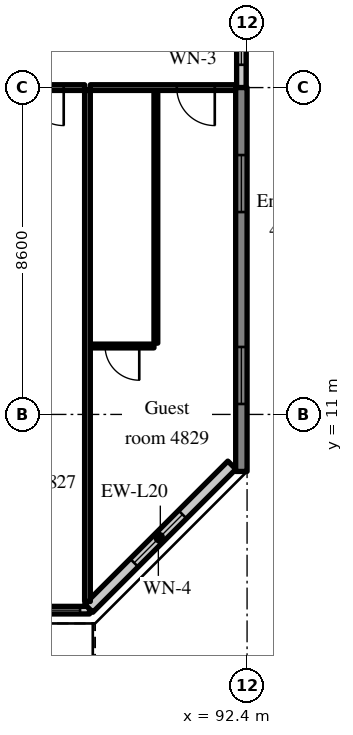
"""IFC4 building model, lengths in metres.
Left out: names, types, materials, properties, quantities, classifications, styles, units other than length and angle.
Written with IfcOpenShell. Run it as: python <this file> out.ifc"""

import sys

from ifc_helpers import new_model, si_unit, direction, frame, frame_2d, origin, place, context, subcontext, project, spatial, rectangle, extrude, source, transform, mapped, element, fill, save


model = new_model("IFC4")
c1 = context("Model", 3, precision=1e-05, world=origin(), true_north=direction((0.0, 1.0)))
c2 = subcontext(c1, "Body", "Model", "MODEL_VIEW")
j1 = project(units=[si_unit("LENGTHUNIT", "METRE"), si_unit("PLANEANGLEUNIT", "RADIAN")], contexts=[c1])
p1 = place(None, origin())
s1 = spatial("IfcSite", under=j1, at=p1, CompositionType="ELEMENT")
p2 = place(p1, origin())
s2 = spatial("IfcBuilding", under=s1, at=p2, CompositionType="ELEMENT")
p3 = place(p2, frame((0.0, 0.0, 197.2)))
s3 = spatial("IfcBuildingStorey", under=s2, at=p3, CompositionType="ELEMENT", Elevation=197.2)
m1 = source(origin(), c2, "Body", "SweptSolid", [
    extrude(rectangle(XDim=10.1, YDim=0.3, at=frame_2d((5.05, 0.0))), origin(), (0.0, 0.0, 1.0), 3.52),
])
p4 = place(p3, frame((92.25, 9.5, 0.0), z_axis=(0.0, 0.0, 1.0), x_axis=(0.0, 1.0, 0.0)))
e1 = element("IfcWall", 1, at=p4, inside=s3, PredefinedType="SHEAR", context=c2, shape_type="MappedRepresentation", body=[
    mapped(m1, transform((0.0, 0.0, 0.0), scale=1.0)),
])
m2 = source(origin(), c2, "Body", "SweptSolid", [
    extrude(rectangle(XDim=1.5, YDim=1.5, at=frame_2d((0.75, 0.75))), frame((0.0, 0.16, 0.0), z_axis=(0.0, -1.0, 0.0), x_axis=(1.0, 0.0, 0.0)), (0.0, 0.0, 1.0), 0.32),
])
p5 = place(p4, frame((1.775, 0.0, 0.9)))
e2 = element("IfcOpeningElement", 2, at=p5, cuts=e1, PredefinedType="OPENING", context=c2, shape_type="MappedRepresentation", body=[
    mapped(m2, transform((0.0, 0.0, 0.0), scale=1.0)),
])
p6 = place(p4, frame((6.825, 0.0, 0.9)))
e3 = element("IfcOpeningElement", 3, at=p6, cuts=e1, PredefinedType="OPENING", context=c2, shape_type="MappedRepresentation", body=[
    mapped(m2, transform((0.0, 0.0, 0.0), scale=1.0)),
])
m3 = source(origin(), c2, "Body", "SweptSolid", [
    extrude(rectangle(XDim=4.105, YDim=0.2, at=frame_2d((2.052, 0.0))), origin(), (0.0, 0.0, 1.0), 2.87),
])
p7 = place(p3, frame((84.15, 5.85, 0.0), z_axis=(0.0, 0.0, 1.0), x_axis=(1.0, 0.0, 0.0)))
e4 = element("IfcWall", 4, at=p7, inside=s3, PredefinedType="SOLIDWALL", context=c2, shape_type="MappedRepresentation", body=[
    mapped(m3, transform((0.0, 0.0, 0.0), scale=1.0)),
])
m4 = source(origin(), c2, "Body", "SweptSolid", [
    extrude(rectangle(XDim=1.2, YDim=2.4, at=frame_2d((0.6, 1.2))), frame((0.0, 0.11, 0.0), z_axis=(0.0, -1.0, 0.0), x_axis=(1.0, 0.0, 0.0)), (0.0, 0.0, 1.0), 0.22),
])
p8 = place(p7, frame((0.25, 0.0, 0.0)))
e5 = element("IfcOpeningElement", 5, at=p8, cuts=e4, PredefinedType="OPENING", context=c2, shape_type="MappedRepresentation", body=[
    mapped(m4, transform((0.0, 0.0, 0.0), scale=1.0)),
])
m5 = source(origin(), c2, "Body", "SweptSolid", [
    extrude(rectangle(XDim=1.5, YDim=1.5, at=frame_2d((0.75, 0.75))), frame((0.0, 0.11, 0.0), z_axis=(0.0, -1.0, 0.0), x_axis=(1.0, 0.0, 0.0)), (0.0, 0.0, 1.0), 0.22),
])
p9 = place(p7, frame((2.355, 0.0, 0.9)))
e6 = element("IfcOpeningElement", 6, at=p9, cuts=e4, PredefinedType="OPENING", context=c2, shape_type="MappedRepresentation", body=[
    mapped(m5, transform((0.0, 0.0, 0.0), scale=1.0)),
])
m6 = source(origin(), c2, "Body", "SweptSolid", [
    extrude(rectangle(XDim=5.326, YDim=0.3, at=frame_2d((2.663, 0.0))), origin(), (0.0, 0.0, 1.0), 3.52),
])
p10 = place(p3, frame((88.234, 5.9, 0.0), z_axis=(0.0, 0.0, 1.0), x_axis=(0.707083859269, 0.707129702361, 0.0)))
e7 = element("IfcWall", 7, at=p10, inside=s3, PredefinedType="SOLIDWALL", context=c2, shape_type="MappedRepresentation", body=[
    mapped(m6, transform((0.0, 0.0, 0.0), scale=1.0)),
])
m7 = source(origin(), c2, "Body", "SweptSolid", [
    extrude(rectangle(XDim=1.8, YDim=1.5, at=frame_2d((0.9, 0.75))), frame((0.0, 0.16, 0.0), z_axis=(0.0, -1.0, 0.0), x_axis=(1.0, 0.0, 0.0)), (0.0, 0.0, 1.0), 0.32),
])
p11 = place(p10, frame((1.689, 0.0, 0.9)))
e8 = element("IfcOpeningElement", 8, at=p11, cuts=e7, PredefinedType="OPENING", context=c2, shape_type="MappedRepresentation", body=[
    mapped(m7, transform((0.0, 0.0, 0.0), scale=1.0)),
])
m8 = source(origin(), c2, "Body", "SweptSolid", [
    extrude(rectangle(XDim=2.4, YDim=0.25, at=frame_2d((1.2, 0.0))), origin(), (0.0, 0.0, 1.0), 2.62),
])
p12 = place(p3, frame((92.25, 19.6, 0.0), z_axis=(0.0, 0.0, 1.0), x_axis=(0.0, 1.0, 0.0)))
e9 = element("IfcWall", 9, at=p12, inside=s3, PredefinedType="SOLIDWALL", context=c2, shape_type="MappedRepresentation", body=[
    mapped(m8, transform((0.0, 0.0, 0.0), scale=1.0)),
])
m9 = source(origin(), c2, "Body", "SweptSolid", [
    extrude(rectangle(XDim=1.2, YDim=1.5, at=frame_2d((0.6, 0.75))), frame((0.0, 0.135, 0.0), z_axis=(0.0, -1.0, 0.0), x_axis=(1.0, 0.0, 0.0)), (0.0, 0.0, 1.0), 0.27),
])
p13 = place(p12, frame((0.6, 0.0, 0.9)))
e10 = element("IfcOpeningElement", 10, at=p13, cuts=e9, PredefinedType="OPENING", context=c2, shape_type="MappedRepresentation", body=[
    mapped(m9, transform((0.0, 0.0, 0.0), scale=1.0)),
])
m10 = source(origin(), c2, "Body", "SweptSolid", [
    extrude(rectangle(XDim=3.975, YDim=0.15, at=frame_2d((1.988, 0.0))), origin(), (0.0, 0.0, 1.0), 2.82),
])
p14 = place(p3, frame((84.15, 19.6, 0.0), z_axis=(0.0, 0.0, 1.0), x_axis=(1.0, 0.0, 0.0)))
e11 = element("IfcWall", 11, at=p14, inside=s3, PredefinedType="PARTITIONING", context=c2, shape_type="MappedRepresentation", body=[
    mapped(m10, transform((0.0, 0.0, 0.0), scale=1.0)),
])
m11 = source(origin(), c2, "Body", "SweptSolid", [
    extrude(rectangle(XDim=1.0, YDim=2.1, at=frame_2d((0.5, 1.05))), frame((0.0, 0.085, 0.0), z_axis=(0.0, -1.0, 0.0), x_axis=(1.0, 0.0, 0.0)), (0.0, 0.0, 1.0), 0.17),
])
p15 = place(p14, frame((2.425, 0.0, 0.0)))
e12 = element("IfcOpeningElement", 12, at=p15, cuts=e11, PredefinedType="OPENING", context=c2, shape_type="MappedRepresentation", body=[
    mapped(m11, transform((0.0, 0.0, 0.0), scale=1.0)),
])
m12 = source(origin(), c2, "Body", "SweptSolid", [
    extrude(rectangle(XDim=6.65, YDim=0.1, at=frame_2d((3.325, 0.0))), origin(), (0.0, 0.0, 1.0), 3.52),
])
p16 = place(p3, frame((90.0, 12.875, 0.0), z_axis=(0.0, 0.0, 1.0), x_axis=(0.0, 1.0, 0.0)))
e13 = element("IfcWall", 13, at=p16, inside=s3, PredefinedType="PARTITIONING", context=c2, shape_type="MappedRepresentation", body=[
    mapped(m12, transform((0.0, 0.0, 0.0), scale=1.0)),
])
m13 = source(origin(), c2, "Body", "SweptSolid", [
    extrude(rectangle(XDim=1.675, YDim=0.1, at=frame_2d((0.837, 0.0))), origin(), (0.0, 0.0, 1.0), 3.52),
])
p17 = place(p3, frame((88.275, 12.8, 0.0), z_axis=(0.0, 0.0, 1.0), x_axis=(1.0, 0.0, 0.0)))
e14 = element("IfcWall", 14, at=p17, inside=s3, PredefinedType="PARTITIONING", context=c2, shape_type="MappedRepresentation", body=[
    mapped(m13, transform((0.0, 0.0, 0.0), scale=1.0)),
])
m14 = source(origin(), c2, "Body", "SweptSolid", [
    extrude(rectangle(XDim=0.9, YDim=2.1, at=frame_2d((0.45, 1.05))), frame((0.0, 0.06, 0.0), z_axis=(0.0, -1.0, 0.0), x_axis=(1.0, 0.0, 0.0)), (0.0, 0.0, 1.0), 0.12),
])
p18 = place(p17, frame((0.388, 0.0, 0.0)))
e15 = element("IfcOpeningElement", 15, at=p18, cuts=e14, PredefinedType="OPENING", context=c2, shape_type="MappedRepresentation", body=[
    mapped(m14, transform((0.0, 0.0, 0.0), scale=1.0)),
])
m15 = source(origin(), c2, "Body", "SweptSolid", [
    extrude(rectangle(XDim=3.825, YDim=0.15, at=frame_2d((1.913, 0.0))), origin(), (0.0, 0.0, 1.0), 2.82),
])
p19 = place(p3, frame((88.275, 19.6, 0.0), z_axis=(0.0, 0.0, 1.0), x_axis=(1.0, 0.0, 0.0)))
e16 = element("IfcWall", 16, at=p19, inside=s3, PredefinedType="PARTITIONING", context=c2, shape_type="MappedRepresentation", body=[
    mapped(m15, transform((0.0, 0.0, 0.0), scale=1.0)),
])
p20 = place(p19, frame((2.275, 0.0, 0.0)))
e17 = element("IfcOpeningElement", 17, at=p20, cuts=e16, PredefinedType="OPENING", context=c2, shape_type="MappedRepresentation", body=[
    mapped(m11, transform((0.0, 0.0, 0.0), scale=1.0)),
])
m16 = source(origin(), c2, "Body", "SweptSolid", [
    extrude(rectangle(XDim=13.447, YDim=0.15, at=frame_2d((6.724, 0.0))), origin(), (0.0, 0.0, 1.0), 3.52),
])
p21 = place(p3, frame((88.2, 6.078, 0.0), z_axis=(0.0, 0.0, 1.0), x_axis=(0.0, 1.0, 0.0)))
e18 = element("IfcWall", 18, at=p21, inside=s3, PredefinedType="PARTITIONING", context=c2, shape_type="MappedRepresentation", body=[
    mapped(m16, transform((0.0, 0.0, 0.0), scale=1.0)),
])
m17 = source(origin(), c2, "Body", "SweptSolid", [
    extrude(rectangle(XDim=1.5, YDim=1.5, at=frame_2d((0.75, 0.75))), frame((0.0, 0.03, 0.0), z_axis=(0.0, -1.0, 0.0), x_axis=(1.0, 0.0, 0.0)), (0.0, 0.0, 1.0), 0.06),
])
p22 = place(p9, origin())
e19 = element("IfcWindow", 19, at=p22, inside=s3, PartitioningType="SINGLE_PANEL", PredefinedType="WINDOW", context=c2, shape_type="MappedRepresentation", body=[
    mapped(m17, transform((0.0, 0.0, 0.0), scale=1.0)),
])
fill(e6, e19)
m18 = source(origin(), c2, "Body", "SweptSolid", [
    extrude(rectangle(XDim=1.8, YDim=1.5, at=frame_2d((0.9, 0.75))), frame((0.0, 0.03, 0.0), z_axis=(0.0, -1.0, 0.0), x_axis=(1.0, 0.0, 0.0)), (0.0, 0.0, 1.0), 0.06),
])
p23 = place(p11, origin())
e20 = element("IfcWindow", 20, at=p23, inside=s3, PartitioningType="SINGLE_PANEL", PredefinedType="WINDOW", context=c2, shape_type="MappedRepresentation", body=[
    mapped(m18, transform((0.0, 0.0, 0.0), scale=1.0)),
])
fill(e8, e20)
p24 = place(p5, origin())
e21 = element("IfcWindow", 21, at=p24, inside=s3, PartitioningType="SINGLE_PANEL", PredefinedType="WINDOW", context=c2, shape_type="MappedRepresentation", body=[
    mapped(m17, transform((0.0, 0.0, 0.0), scale=1.0)),
])
fill(e2, e21)
p25 = place(p6, origin())
e22 = element("IfcWindow", 22, at=p25, inside=s3, PartitioningType="SINGLE_PANEL", PredefinedType="WINDOW", context=c2, shape_type="MappedRepresentation", body=[
    mapped(m17, transform((0.0, 0.0, 0.0), scale=1.0)),
])
fill(e3, e22)
m19 = source(origin(), c2, "Body", "SweptSolid", [
    extrude(rectangle(XDim=1.2, YDim=1.5, at=frame_2d((0.6, 0.75))), frame((0.0, 0.03, 0.0), z_axis=(0.0, -1.0, 0.0), x_axis=(1.0, 0.0, 0.0)), (0.0, 0.0, 1.0), 0.06),
])
p26 = place(p13, origin())
e23 = element("IfcWindow", 23, at=p26, inside=s3, PartitioningType="SINGLE_PANEL", PredefinedType="WINDOW", context=c2, shape_type="MappedRepresentation", body=[
    mapped(m19, transform((0.0, 0.0, 0.0), scale=1.0)),
])
fill(e10, e23)
m20 = source(origin(), c2, "Body", "SweptSolid", [
    extrude(rectangle(XDim=1.0, YDim=2.1, at=frame_2d((0.5, 1.05))), frame((0.0, 0.025, 0.0), z_axis=(0.0, -1.0, 0.0), x_axis=(1.0, 0.0, 0.0)), (0.0, 0.0, 1.0), 0.05),
])
p27 = place(p15, origin())
e24 = element("IfcDoor", 24, at=p27, inside=s3, OperationType="SINGLE_SWING_RIGHT", PredefinedType="DOOR", context=c2, shape_type="MappedRepresentation", body=[
    mapped(m20, transform((0.0, 0.0, 0.0), scale=1.0)),
])
fill(e12, e24)
m21 = source(origin(), c2, "Body", "SweptSolid", [
    extrude(rectangle(XDim=0.9, YDim=2.1, at=frame_2d((0.45, 1.05))), frame((0.0, 0.025, 0.0), z_axis=(0.0, -1.0, 0.0), x_axis=(1.0, 0.0, 0.0)), (0.0, 0.0, 1.0), 0.05),
])
p28 = place(p18, origin())
e25 = element("IfcDoor", 25, at=p28, inside=s3, OperationType="SINGLE_SWING_RIGHT", PredefinedType="DOOR", context=c2, shape_type="MappedRepresentation", body=[
    mapped(m21, transform((0.0, 0.0, 0.0), scale=1.0)),
])
fill(e15, e25)
p29 = place(p20, origin())
e26 = element("IfcDoor", 26, at=p29, inside=s3, OperationType="SINGLE_SWING_RIGHT", PredefinedType="DOOR", context=c2, shape_type="MappedRepresentation", body=[
    mapped(m20, transform((0.0, 0.0, 0.0), scale=1.0)),
])
fill(e17, e26)
save(model, sys.argv[1])
